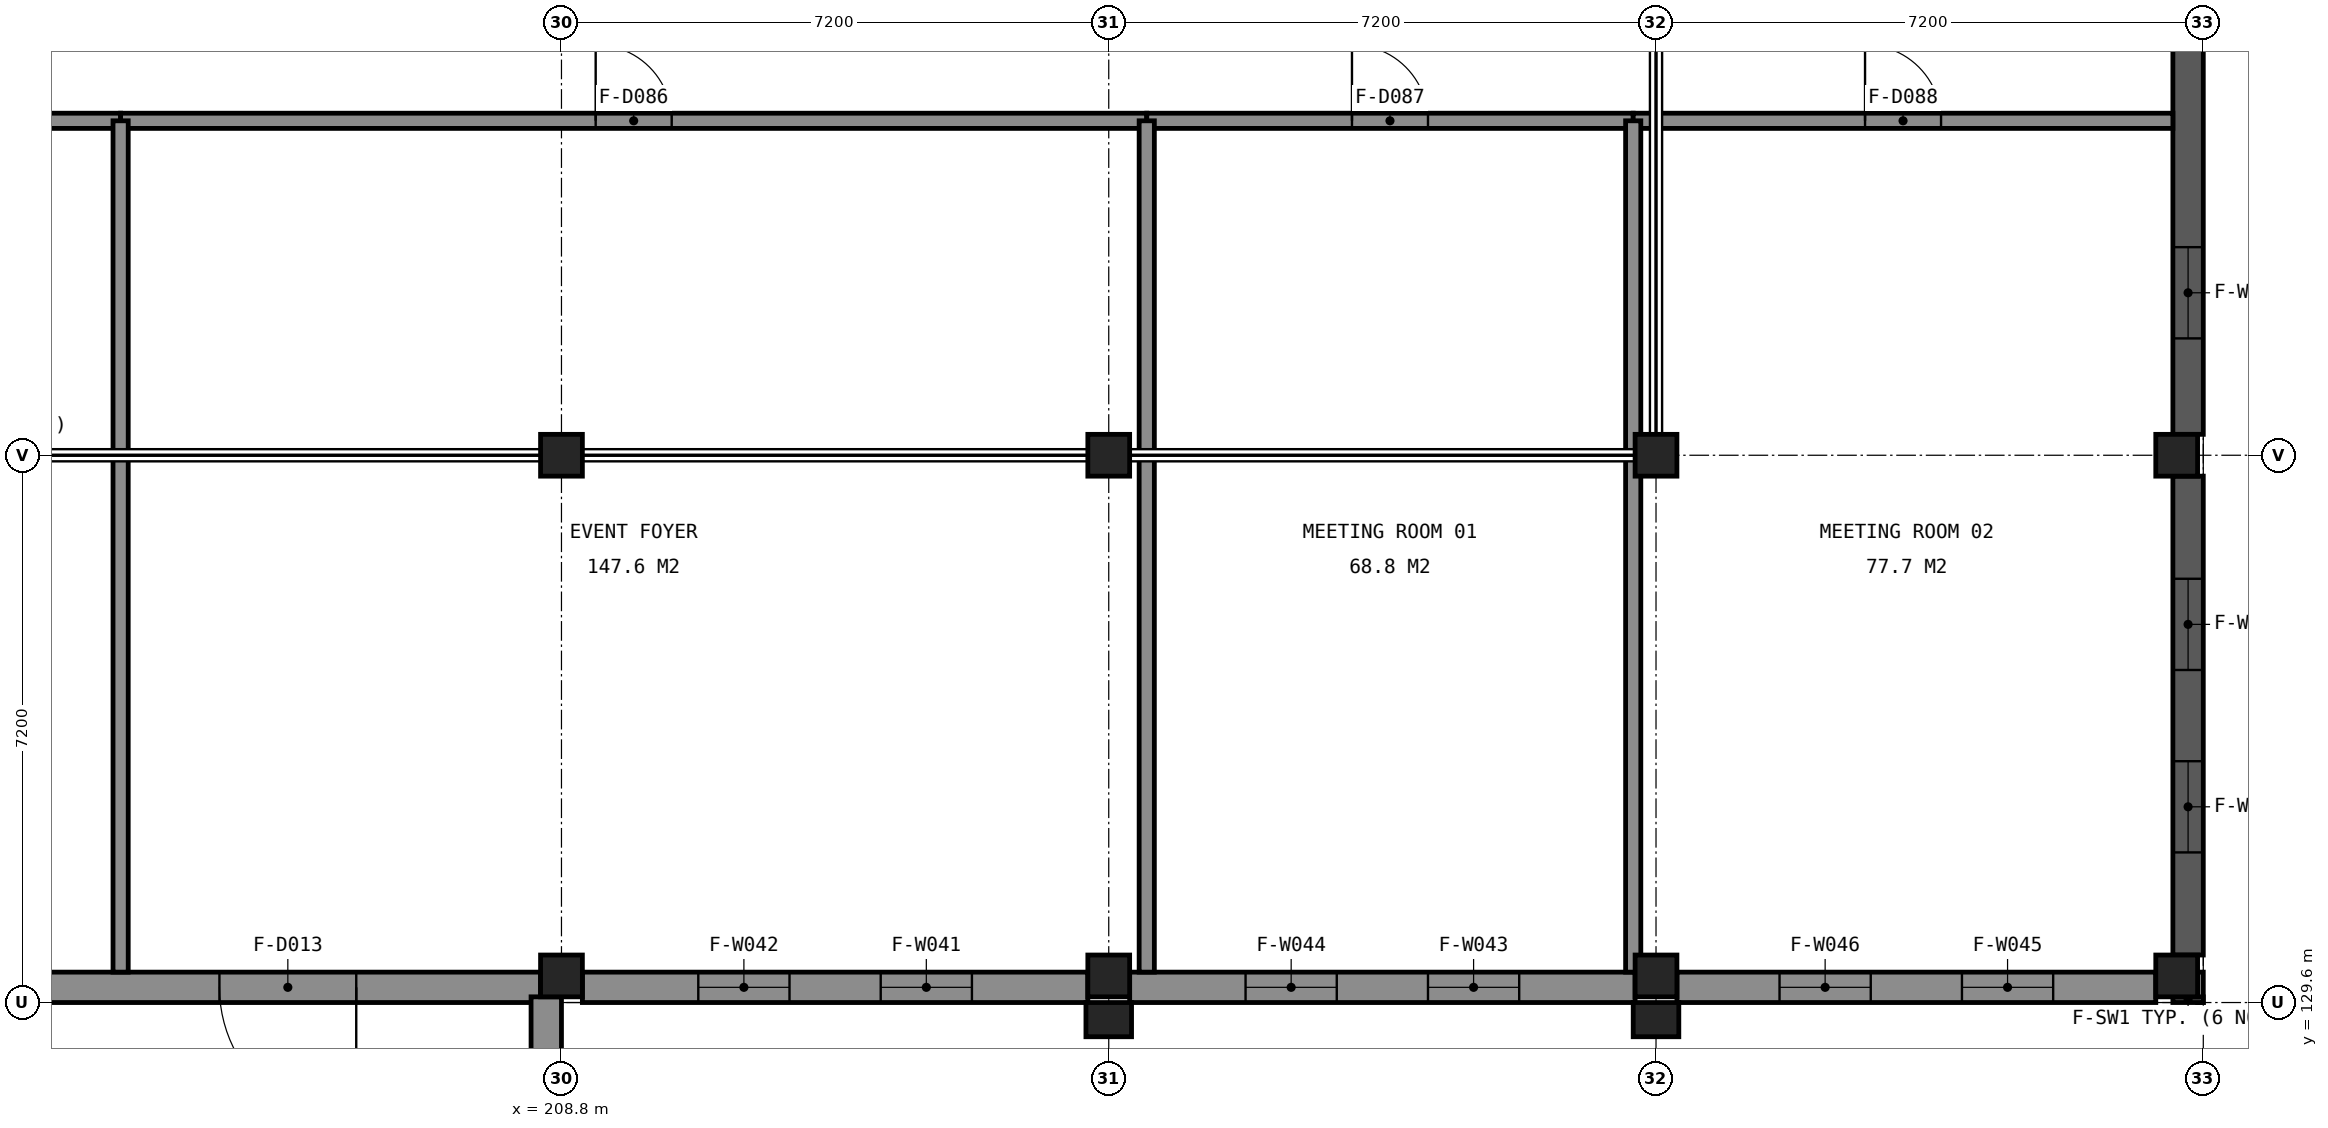
"""IFC4 building model, lengths in metres.
Left out: names, types, materials, properties, quantities, classifications, styles, units other than length and angle.
Written with IfcOpenShell. Run it as: python <this file> out.ifc"""

import sys

from ifc_helpers import new_model, si_unit, direction, frame, frame_2d, origin, origin_2d, place, context, subcontext, project, spatial, rectangle, extrude, element, fill, save


model = new_model("IFC4")
c1 = context("Model", 3, precision=1e-05, world=origin(), true_north=direction((0.0, 1.0)))
c2 = subcontext(c1, "Body", "Model", "MODEL_VIEW")
j1 = project(units=[si_unit("LENGTHUNIT", "METRE"), si_unit("PLANEANGLEUNIT", "RADIAN")], contexts=[c1])
p1 = place(None, origin())
s1 = spatial("IfcSite", under=j1, at=p1, CompositionType="ELEMENT")
p2 = place(p1, origin())
s2 = spatial("IfcBuilding", under=s1, at=p2, CompositionType="ELEMENT")
p3 = place(p2, frame((0.0, 0.0, 14.4)))
s3 = spatial("IfcBuildingStorey", under=s2, at=p3, CompositionType="ELEMENT", Elevation=14.4)
for number, where, z_axis, x_axis in (
    (1, (208.8, 129.95, 0.0), (0.0, 0.0, 1.0), (1.0, 0.0, 0.0)),
    (2, (216.0, 129.95, 0.0), (0.0, 0.0, 1.0), (1.0, 0.0, 0.0)),
    (3, (223.2, 129.95, 0.0), (0.0, 0.0, 1.0), (1.0, 0.0, 0.0)),
    (4, (230.05, 129.95, 0.0), (0.0, 0.0, 1.0), (1.0, 0.0, 0.0)),
    (5, (208.8, 136.8, 0.0), (0.0, 0.0, 1.0), (1.0, 0.0, 0.0)),
    (6, (216.0, 136.8, 0.0), (0.0, 0.0, 1.0), (1.0, 0.0, 0.0)),
    (7, (223.2, 136.8, 0.0), (0.0, 0.0, 1.0), (1.0, 0.0, 0.0)),
    (8, (230.05, 136.8, 0.0), (0.0, 0.0, 1.0), (1.0, 0.0, 0.0)),
):
    element("IfcColumn", number, at=place(p3, frame(where, z_axis=z_axis, x_axis=x_axis)), inside=s3, PredefinedType="COLUMN", context=c2, shape_type="SweptSolid", body=[
        extrude(rectangle(XDim=0.55, YDim=0.55, at=origin_2d()), origin(), (0.0, 0.0, 1.0), 4.8),
    ])
p4 = place(p3, frame((208.525, 129.8, 0.0), z_axis=(0.0, 0.0, 1.0), x_axis=(-1.0, 0.0, 0.0)))
e9 = element("IfcWall", 9, at=p4, inside=s3, PredefinedType="SOLIDWALL", context=c2, shape_type="SweptSolid", body=[
    extrude(rectangle(XDim=6.65, YDim=0.4, at=frame_2d((3.325, 0.0))), origin(), (0.0, 0.0, 1.0), 3.95),
])
p5 = place(p4, frame((2.425, 0.0, 0.0)))
e10 = element("IfcOpeningElement", 10, at=p5, cuts=e9, PredefinedType="OPENING", context=c2, shape_type="SweptSolid", body=[
    extrude(rectangle(XDim=1.8, YDim=2.1, at=frame_2d((0.9, 1.05))), frame((0.0, 0.21, 0.0), z_axis=(0.0, -1.0, 0.0), x_axis=(1.0, 0.0, 0.0)), (0.0, 0.0, 1.0), 0.42),
])
p6 = place(p3, frame((215.725, 129.8, 0.0), z_axis=(0.0, 0.0, 1.0), x_axis=(-1.0, 0.0, 0.0)))
e11 = element("IfcWall", 11, at=p6, inside=s3, PredefinedType="SOLIDWALL", context=c2, shape_type="SweptSolid", body=[
    extrude(rectangle(XDim=6.65, YDim=0.4, at=frame_2d((3.325, 0.0))), origin(), (0.0, 0.0, 1.0), 3.95),
])
p7 = place(p6, frame((1.525, 0.0, 1.8)))
e12 = element("IfcOpeningElement", 12, at=p7, cuts=e11, PredefinedType="OPENING", context=c2, shape_type="SweptSolid", body=[
    extrude(rectangle(XDim=1.2, YDim=1.2, at=frame_2d((0.6, 0.6))), frame((0.0, 0.21, 0.0), z_axis=(0.0, -1.0, 0.0), x_axis=(1.0, 0.0, 0.0)), (0.0, 0.0, 1.0), 0.42),
])
p8 = place(p6, frame((3.925, 0.0, 1.8)))
e13 = element("IfcOpeningElement", 13, at=p8, cuts=e11, PredefinedType="OPENING", context=c2, shape_type="SweptSolid", body=[
    extrude(rectangle(XDim=1.2, YDim=1.2, at=frame_2d((0.6, 0.6))), frame((0.0, 0.21, 0.0), z_axis=(0.0, -1.0, 0.0), x_axis=(1.0, 0.0, 0.0)), (0.0, 0.0, 1.0), 0.42),
])
p9 = place(p3, frame((222.925, 129.8, 0.0), z_axis=(0.0, 0.0, 1.0), x_axis=(-1.0, 0.0, 0.0)))
e14 = element("IfcWall", 14, at=p9, inside=s3, PredefinedType="SOLIDWALL", context=c2, shape_type="SweptSolid", body=[
    extrude(rectangle(XDim=6.65, YDim=0.4, at=frame_2d((3.325, 0.0))), origin(), (0.0, 0.0, 1.0), 3.95),
])
p10 = place(p9, frame((1.525, 0.0, 1.8)))
e15 = element("IfcOpeningElement", 15, at=p10, cuts=e14, PredefinedType="OPENING", context=c2, shape_type="SweptSolid", body=[
    extrude(rectangle(XDim=1.2, YDim=1.2, at=frame_2d((0.6, 0.6))), frame((0.0, 0.21, 0.0), z_axis=(0.0, -1.0, 0.0), x_axis=(1.0, 0.0, 0.0)), (0.0, 0.0, 1.0), 0.42),
])
p11 = place(p9, frame((3.925, 0.0, 1.8)))
e16 = element("IfcOpeningElement", 16, at=p11, cuts=e14, PredefinedType="OPENING", context=c2, shape_type="SweptSolid", body=[
    extrude(rectangle(XDim=1.2, YDim=1.2, at=frame_2d((0.6, 0.6))), frame((0.0, 0.21, 0.0), z_axis=(0.0, -1.0, 0.0), x_axis=(1.0, 0.0, 0.0)), (0.0, 0.0, 1.0), 0.42),
])
p12 = place(p3, frame((229.775, 129.8, 0.0), z_axis=(0.0, 0.0, 1.0), x_axis=(-1.0, 0.0, 0.0)))
e17 = element("IfcWall", 17, at=p12, inside=s3, PredefinedType="SOLIDWALL", context=c2, shape_type="SweptSolid", body=[
    extrude(rectangle(XDim=6.3, YDim=0.4, at=frame_2d((3.15, 0.0))), origin(), (0.0, 0.0, 1.0), 3.95),
])
p13 = place(p12, frame((1.35, 0.0, 1.8)))
e18 = element("IfcOpeningElement", 18, at=p13, cuts=e17, PredefinedType="OPENING", context=c2, shape_type="SweptSolid", body=[
    extrude(rectangle(XDim=1.2, YDim=1.2, at=frame_2d((0.6, 0.6))), frame((0.0, 0.21, 0.0), z_axis=(0.0, -1.0, 0.0), x_axis=(1.0, 0.0, 0.0)), (0.0, 0.0, 1.0), 0.42),
])
p14 = place(p12, frame((3.75, 0.0, 1.8)))
e19 = element("IfcOpeningElement", 19, at=p14, cuts=e17, PredefinedType="OPENING", context=c2, shape_type="SweptSolid", body=[
    extrude(rectangle(XDim=1.2, YDim=1.2, at=frame_2d((0.6, 0.6))), frame((0.0, 0.21, 0.0), z_axis=(0.0, -1.0, 0.0), x_axis=(1.0, 0.0, 0.0)), (0.0, 0.0, 1.0), 0.42),
])
p15 = place(p3, frame((230.4, 129.8, 0.0), z_axis=(0.0, 0.0, 1.0), x_axis=(-1.0, 0.0, 0.0)))
e20 = element("IfcWall", 20, at=p15, inside=s3, PredefinedType="SOLIDWALL", context=c2, shape_type="SweptSolid", body=[
    extrude(rectangle(XDim=0.075, YDim=0.4, at=frame_2d((0.038, 0.0))), origin(), (0.0, 0.0, 1.0), 3.95),
])
p16 = place(p3, frame((230.2, 129.675, 0.0), z_axis=(0.0, 0.0, 1.0), x_axis=(0.0, -1.0, 0.0)))
e21 = element("IfcWall", 21, at=p16, inside=s3, PredefinedType="SHEAR", context=c2, shape_type="SweptSolid", body=[
    extrude(rectangle(XDim=0.075, YDim=0.4, at=frame_2d((0.038, 0.0))), origin(), (0.0, 0.0, 1.0), 3.95),
])
p17 = place(p3, frame((230.2, 136.525, 0.0), z_axis=(0.0, 0.0, 1.0), x_axis=(0.0, -1.0, 0.0)))
e22 = element("IfcWall", 22, at=p17, inside=s3, PredefinedType="SHEAR", context=c2, shape_type="SweptSolid", body=[
    extrude(rectangle(XDim=6.3, YDim=0.4, at=frame_2d((3.15, 0.0))), origin(), (0.0, 0.0, 1.0), 3.95),
])
p18 = place(p17, frame((1.35, 0.0, 1.8)))
e23 = element("IfcOpeningElement", 23, at=p18, cuts=e22, PredefinedType="OPENING", context=c2, shape_type="SweptSolid", body=[
    extrude(rectangle(XDim=1.2, YDim=1.2, at=frame_2d((0.6, 0.6))), frame((0.0, 0.21, 0.0), z_axis=(0.0, -1.0, 0.0), x_axis=(1.0, 0.0, 0.0)), (0.0, 0.0, 1.0), 0.42),
])
p19 = place(p17, frame((3.75, 0.0, 1.8)))
e24 = element("IfcOpeningElement", 24, at=p19, cuts=e22, PredefinedType="OPENING", context=c2, shape_type="SweptSolid", body=[
    extrude(rectangle(XDim=1.2, YDim=1.2, at=frame_2d((0.6, 0.6))), frame((0.0, 0.21, 0.0), z_axis=(0.0, -1.0, 0.0), x_axis=(1.0, 0.0, 0.0)), (0.0, 0.0, 1.0), 0.42),
])
p20 = place(p3, frame((230.2, 143.2, 0.0), z_axis=(0.0, 0.0, 1.0), x_axis=(0.0, -1.0, 0.0)))
e25 = element("IfcWall", 25, at=p20, inside=s3, PredefinedType="SHEAR", context=c2, shape_type="SweptSolid", body=[
    extrude(rectangle(XDim=6.125, YDim=0.4, at=frame_2d((3.062, 0.0))), origin(), (0.0, 0.0, 1.0), 3.95),
])
p21 = place(p20, frame((3.663, 0.0, 1.8)))
e26 = element("IfcOpeningElement", 26, at=p21, cuts=e25, PredefinedType="OPENING", context=c2, shape_type="SweptSolid", body=[
    extrude(rectangle(XDim=1.2, YDim=1.2, at=frame_2d((0.6, 0.6))), frame((0.0, 0.21, 0.0), z_axis=(0.0, -1.0, 0.0), x_axis=(1.0, 0.0, 0.0)), (0.0, 0.0, 1.0), 0.42),
])
p22 = place(p3, frame((230.4, 129.8, 4.8), z_axis=(0.0, 0.0, 1.0), x_axis=(-1.0, 0.0, 0.0)))
e27 = element("IfcWall", 27, at=p22, inside=s3, PredefinedType="SOLIDWALL", context=c2, shape_type="SweptSolid", body=[
    extrude(rectangle(XDim=72.0, YDim=0.4, at=frame_2d((36.0, 0.0))), origin(), (0.0, 0.0, 1.0), 0.45),
])
p23 = place(p3, frame((230.2, 150.8, 4.8), z_axis=(0.0, 0.0, 1.0), x_axis=(0.0, -1.0, 0.0)))
e28 = element("IfcWall", 28, at=p23, inside=s3, PredefinedType="SOLIDWALL", context=c2, shape_type="SweptSolid", body=[
    extrude(rectangle(XDim=20.8, YDim=0.4, at=frame_2d((10.4, 0.0))), origin(), (0.0, 0.0, 1.0), 0.45),
])
for number, where, z_axis, x_axis in (
    (29, (208.8, 136.8, 4.8), (0.0, 0.0, 1.0), (1.0, 0.0, 0.0)),
    (30, (216.0, 136.8, 4.8), (0.0, 0.0, 1.0), (1.0, 0.0, 0.0)),
    (31, (223.2, 136.8, 4.8), (0.0, 0.0, 1.0), (1.0, 0.0, 0.0)),
):
    element("IfcColumn", number, at=place(p3, frame(where, z_axis=z_axis, x_axis=x_axis)), inside=s3, PredefinedType="COLUMN", context=c2, shape_type="SweptSolid", body=[
        extrude(rectangle(XDim=0.3, YDim=0.3, at=origin_2d()), origin(), (0.0, 0.0, 1.0), 1.4),
    ])
for number, where, z_axis, x_axis in (
    (32, (216.0, 129.375, 0.0), (0.0, 0.0, 1.0), (1.0, 0.0, 0.0)),
    (33, (223.2, 129.375, 0.0), (0.0, 0.0, 1.0), (1.0, 0.0, 0.0)),
):
    element("IfcColumn", number, at=place(p3, frame(where, z_axis=z_axis, x_axis=x_axis)), inside=s3, PredefinedType="PILASTER", context=c2, shape_type="SweptSolid", body=[
        extrude(rectangle(XDim=0.6, YDim=0.45, at=origin_2d()), origin(), (0.0, 0.0, 1.0), 4.05),
    ])
p24 = place(p3, frame((230.4, 129.1, 4.5), z_axis=(0.0, 0.0, 1.0), x_axis=(-1.0, 0.0, 0.0)))
e34 = element("IfcWall", 34, at=p24, inside=s3, PredefinedType="SOLIDWALL", context=c2, shape_type="SweptSolid", body=[
    extrude(rectangle(XDim=21.0, YDim=0.2, at=frame_2d((10.5, 0.0))), origin(), (0.0, 0.0, 1.0), 0.45),
])
p25 = place(p3, frame((208.6, 129.675, 0.0), z_axis=(0.0, 0.0, 1.0), x_axis=(0.0, -1.0, 0.0)))
e35 = element("IfcWall", 35, at=p25, inside=s3, PredefinedType="SOLIDWALL", context=c2, shape_type="SweptSolid", body=[
    extrude(rectangle(XDim=2.675, YDim=0.4, at=frame_2d((1.337, 0.0))), origin(), (0.0, 0.0, 1.0), 4.55),
])
p26 = place(p25, frame((0.738, 0.0, 1.8)))
e36 = element("IfcOpeningElement", 36, at=p26, cuts=e35, PredefinedType="OPENING", context=c2, shape_type="SweptSolid", body=[
    extrude(rectangle(XDim=1.2, YDim=1.2, at=frame_2d((0.6, 0.6))), frame((0.0, 0.21, 0.0), z_axis=(0.0, -1.0, 0.0), x_axis=(1.0, 0.0, 0.0)), (0.0, 0.0, 1.0), 0.42),
])
p27 = place(p3, frame((158.8, 141.2, 0.0), z_axis=(0.0, 0.0, 1.0), x_axis=(1.0, 0.0, 0.0)))
e37 = element("IfcWall", 37, at=p27, inside=s3, PredefinedType="PARTITIONING", context=c2, shape_type="SweptSolid", body=[
    extrude(rectangle(XDim=44.2, YDim=0.2, at=frame_2d((22.1, 0.0))), origin(), (0.0, 0.0, 1.0), 3.95),
])
p28 = place(p27, frame((21.2, 0.0, 0.0)))
e38 = element("IfcOpeningElement", 38, at=p28, cuts=e37, PredefinedType="OPENING", context=c2, shape_type="SweptSolid", body=[
    extrude(rectangle(XDim=1.8, YDim=2.1, at=frame_2d((0.9, 1.05))), frame((0.0, 0.11, 0.0), z_axis=(0.0, -1.0, 0.0), x_axis=(1.0, 0.0, 0.0)), (0.0, 0.0, 1.0), 0.22),
])
p29 = place(p3, frame((203.0, 141.2, 0.0), z_axis=(0.0, 0.0, 1.0), x_axis=(1.0, 0.0, 0.0)))
e39 = element("IfcWall", 39, at=p29, inside=s3, PredefinedType="PARTITIONING", context=c2, shape_type="SweptSolid", body=[
    extrude(rectangle(XDim=13.5, YDim=0.2, at=frame_2d((6.75, 0.0))), origin(), (0.0, 0.0, 1.0), 3.95),
])
p30 = place(p29, frame((6.25, 0.0, 0.0)))
e40 = element("IfcOpeningElement", 40, at=p30, cuts=e39, PredefinedType="OPENING", context=c2, shape_type="SweptSolid", body=[
    extrude(rectangle(XDim=1.0, YDim=2.1, at=frame_2d((0.5, 1.05))), frame((0.0, 0.11, 0.0), z_axis=(0.0, -1.0, 0.0), x_axis=(1.0, 0.0, 0.0)), (0.0, 0.0, 1.0), 0.22),
])
p31 = place(p3, frame((216.5, 141.2, 0.0), z_axis=(0.0, 0.0, 1.0), x_axis=(1.0, 0.0, 0.0)))
e41 = element("IfcWall", 41, at=p31, inside=s3, PredefinedType="PARTITIONING", context=c2, shape_type="SweptSolid", body=[
    extrude(rectangle(XDim=6.4, YDim=0.2, at=frame_2d((3.2, 0.0))), origin(), (0.0, 0.0, 1.0), 3.95),
])
p32 = place(p31, frame((2.7, 0.0, 0.0)))
e42 = element("IfcOpeningElement", 42, at=p32, cuts=e41, PredefinedType="OPENING", context=c2, shape_type="SweptSolid", body=[
    extrude(rectangle(XDim=1.0, YDim=2.1, at=frame_2d((0.5, 1.05))), frame((0.0, 0.11, 0.0), z_axis=(0.0, -1.0, 0.0), x_axis=(1.0, 0.0, 0.0)), (0.0, 0.0, 1.0), 0.22),
])
p33 = place(p3, frame((222.9, 141.2, 0.0), z_axis=(0.0, 0.0, 1.0), x_axis=(1.0, 0.0, 0.0)))
e43 = element("IfcWall", 43, at=p33, inside=s3, PredefinedType="PARTITIONING", context=c2, shape_type="SweptSolid", body=[
    extrude(rectangle(XDim=7.1, YDim=0.2, at=frame_2d((3.55, 0.0))), origin(), (0.0, 0.0, 1.0), 3.95),
])
p34 = place(p33, frame((3.05, 0.0, 0.0)))
e44 = element("IfcOpeningElement", 44, at=p34, cuts=e43, PredefinedType="OPENING", context=c2, shape_type="SweptSolid", body=[
    extrude(rectangle(XDim=1.0, YDim=2.1, at=frame_2d((0.5, 1.05))), frame((0.0, 0.11, 0.0), z_axis=(0.0, -1.0, 0.0), x_axis=(1.0, 0.0, 0.0)), (0.0, 0.0, 1.0), 0.22),
])
for number, where, z_axis, x_axis in (
    (45, (203.0, 130.0, 0.0), (0.0, 0.0, 1.0), (0.0, 1.0, 0.0)),
    (46, (216.5, 130.0, 0.0), (0.0, 0.0, 1.0), (0.0, 1.0, 0.0)),
    (47, (222.9, 130.0, 0.0), (0.0, 0.0, 1.0), (0.0, 1.0, 0.0)),
):
    element("IfcWall", number, at=place(p3, frame(where, z_axis=z_axis, x_axis=x_axis)), inside=s3, PredefinedType="PARTITIONING", context=c2, shape_type="SweptSolid", body=[
        extrude(rectangle(XDim=11.2, YDim=0.2, at=frame_2d((5.6, 0.0))), origin(), (0.0, 0.0, 1.0), 3.95),
    ])
p35 = place(p5, origin())
e48 = element("IfcDoor", 48, at=p35, inside=s3, OperationType="NOTDEFINED", PredefinedType="DOOR", context=c2, shape_type="SweptSolid", body=[
    extrude(rectangle(XDim=1.8, YDim=2.1, at=frame_2d((0.9, 1.05))), frame((0.0, 0.025, 0.0), z_axis=(0.0, -1.0, 0.0), x_axis=(1.0, 0.0, 0.0)), (0.0, 0.0, 1.0), 0.05),
])
fill(e10, e48)
p36 = place(p7, origin())
e49 = element("IfcWindow", 49, at=p36, inside=s3, PartitioningType="SINGLE_PANEL", PredefinedType="WINDOW", context=c2, shape_type="SweptSolid", body=[
    extrude(rectangle(XDim=1.2, YDim=1.2, at=frame_2d((0.6, 0.6))), frame((0.0, -0.09, 0.0), z_axis=(0.0, -1.0, 0.0), x_axis=(1.0, 0.0, 0.0)), (0.0, 0.0, 1.0), 0.06),
])
fill(e12, e49)
p37 = place(p8, origin())
e50 = element("IfcWindow", 50, at=p37, inside=s3, PartitioningType="SINGLE_PANEL", PredefinedType="WINDOW", context=c2, shape_type="SweptSolid", body=[
    extrude(rectangle(XDim=1.2, YDim=1.2, at=frame_2d((0.6, 0.6))), frame((0.0, -0.09, 0.0), z_axis=(0.0, -1.0, 0.0), x_axis=(1.0, 0.0, 0.0)), (0.0, 0.0, 1.0), 0.06),
])
fill(e13, e50)
p38 = place(p10, origin())
e51 = element("IfcWindow", 51, at=p38, inside=s3, PartitioningType="SINGLE_PANEL", PredefinedType="WINDOW", context=c2, shape_type="SweptSolid", body=[
    extrude(rectangle(XDim=1.2, YDim=1.2, at=frame_2d((0.6, 0.6))), frame((0.0, -0.09, 0.0), z_axis=(0.0, -1.0, 0.0), x_axis=(1.0, 0.0, 0.0)), (0.0, 0.0, 1.0), 0.06),
])
fill(e15, e51)
p39 = place(p11, origin())
e52 = element("IfcWindow", 52, at=p39, inside=s3, PartitioningType="SINGLE_PANEL", PredefinedType="WINDOW", context=c2, shape_type="SweptSolid", body=[
    extrude(rectangle(XDim=1.2, YDim=1.2, at=frame_2d((0.6, 0.6))), frame((0.0, -0.09, 0.0), z_axis=(0.0, -1.0, 0.0), x_axis=(1.0, 0.0, 0.0)), (0.0, 0.0, 1.0), 0.06),
])
fill(e16, e52)
p40 = place(p13, origin())
e53 = element("IfcWindow", 53, at=p40, inside=s3, PartitioningType="SINGLE_PANEL", PredefinedType="WINDOW", context=c2, shape_type="SweptSolid", body=[
    extrude(rectangle(XDim=1.2, YDim=1.2, at=frame_2d((0.6, 0.6))), frame((0.0, -0.09, 0.0), z_axis=(0.0, -1.0, 0.0), x_axis=(1.0, 0.0, 0.0)), (0.0, 0.0, 1.0), 0.06),
])
fill(e18, e53)
p41 = place(p14, origin())
e54 = element("IfcWindow", 54, at=p41, inside=s3, PartitioningType="SINGLE_PANEL", PredefinedType="WINDOW", context=c2, shape_type="SweptSolid", body=[
    extrude(rectangle(XDim=1.2, YDim=1.2, at=frame_2d((0.6, 0.6))), frame((0.0, -0.09, 0.0), z_axis=(0.0, -1.0, 0.0), x_axis=(1.0, 0.0, 0.0)), (0.0, 0.0, 1.0), 0.06),
])
fill(e19, e54)
p42 = place(p18, origin())
e55 = element("IfcWindow", 55, at=p42, inside=s3, PartitioningType="SINGLE_PANEL", PredefinedType="WINDOW", context=c2, shape_type="SweptSolid", body=[
    extrude(rectangle(XDim=1.2, YDim=1.2, at=frame_2d((0.6, 0.6))), frame((0.0, -0.09, 0.0), z_axis=(0.0, -1.0, 0.0), x_axis=(1.0, 0.0, 0.0)), (0.0, 0.0, 1.0), 0.06),
])
fill(e23, e55)
p43 = place(p19, origin())
e56 = element("IfcWindow", 56, at=p43, inside=s3, PartitioningType="SINGLE_PANEL", PredefinedType="WINDOW", context=c2, shape_type="SweptSolid", body=[
    extrude(rectangle(XDim=1.2, YDim=1.2, at=frame_2d((0.6, 0.6))), frame((0.0, -0.09, 0.0), z_axis=(0.0, -1.0, 0.0), x_axis=(1.0, 0.0, 0.0)), (0.0, 0.0, 1.0), 0.06),
])
fill(e24, e56)
p44 = place(p21, origin())
e57 = element("IfcWindow", 57, at=p44, inside=s3, PartitioningType="SINGLE_PANEL", PredefinedType="WINDOW", context=c2, shape_type="SweptSolid", body=[
    extrude(rectangle(XDim=1.2, YDim=1.2, at=frame_2d((0.6, 0.6))), frame((0.0, -0.09, 0.0), z_axis=(0.0, -1.0, 0.0), x_axis=(1.0, 0.0, 0.0)), (0.0, 0.0, 1.0), 0.06),
])
fill(e26, e57)
p45 = place(p30, origin())
e58 = element("IfcDoor", 58, at=p45, inside=s3, OperationType="NOTDEFINED", PredefinedType="DOOR", context=c2, shape_type="SweptSolid", body=[
    extrude(rectangle(XDim=1.0, YDim=2.1, at=frame_2d((0.5, 1.05))), frame((0.0, 0.025, 0.0), z_axis=(0.0, -1.0, 0.0), x_axis=(1.0, 0.0, 0.0)), (0.0, 0.0, 1.0), 0.05),
])
fill(e40, e58)
p46 = place(p32, origin())
e59 = element("IfcDoor", 59, at=p46, inside=s3, OperationType="NOTDEFINED", PredefinedType="DOOR", context=c2, shape_type="SweptSolid", body=[
    extrude(rectangle(XDim=1.0, YDim=2.1, at=frame_2d((0.5, 1.05))), frame((0.0, 0.025, 0.0), z_axis=(0.0, -1.0, 0.0), x_axis=(1.0, 0.0, 0.0)), (0.0, 0.0, 1.0), 0.05),
])
fill(e42, e59)
p47 = place(p34, origin())
e60 = element("IfcDoor", 60, at=p47, inside=s3, OperationType="NOTDEFINED", PredefinedType="DOOR", context=c2, shape_type="SweptSolid", body=[
    extrude(rectangle(XDim=1.0, YDim=2.1, at=frame_2d((0.5, 1.05))), frame((0.0, 0.025, 0.0), z_axis=(0.0, -1.0, 0.0), x_axis=(1.0, 0.0, 0.0)), (0.0, 0.0, 1.0), 0.05),
])
fill(e44, e60)
save(model, sys.argv[1])
